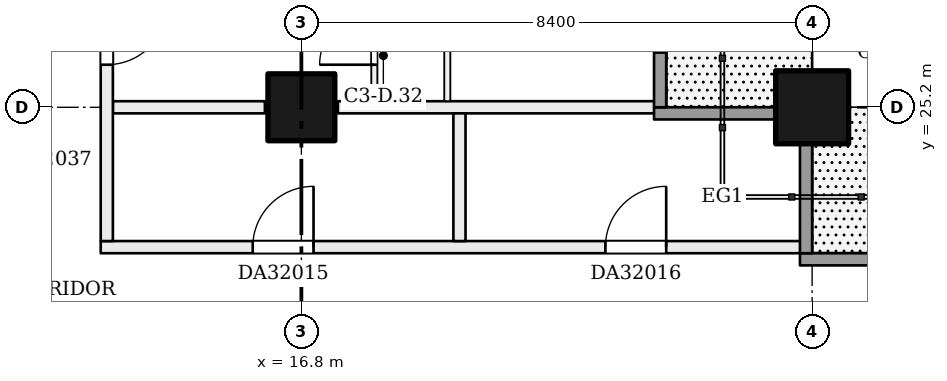
"""IFC4 building model, lengths in metres.
Left out: names, types, materials, properties, quantities, classifications, styles, units other than length and angle.
Written with IfcOpenShell. Run it as: python <this file> out.ifc"""

import sys

from ifc_helpers import new_model, si_unit, direction, frame, frame_2d, origin, origin_2d, place, context, subcontext, project, spatial, rectangle, extrude, element, fill, save


model = new_model("IFC4")
c1 = context("Model", 3, precision=1e-05, world=origin(), true_north=direction((0.0, 1.0)))
c2 = subcontext(c1, "Body", "Model", "MODEL_VIEW")
j1 = project(units=[si_unit("LENGTHUNIT", "METRE"), si_unit("PLANEANGLEUNIT", "RADIAN")], contexts=[c1])
p1 = place(None, origin())
s1 = spatial("IfcSite", under=j1, at=p1, CompositionType="ELEMENT")
p2 = place(p1, origin())
s2 = spatial("IfcBuilding", under=s1, at=p2, CompositionType="ELEMENT")
p3 = place(p2, frame((0.0, 0.0, 126.7)))
s3 = spatial("IfcBuildingStorey", under=s2, at=p3, CompositionType="ELEMENT", Elevation=126.7)
p4 = place(p3, frame((16.8, 25.2, 0.0), z_axis=(0.0, 0.0, 1.0), x_axis=(1.0, 0.0, 0.0)))
e1 = element("IfcColumn", 1, at=p4, inside=s3, PredefinedType="COLUMN", context=c2, shape_type="SweptSolid", body=[
    extrude(rectangle(XDim=1.1, YDim=1.1, at=origin_2d()), origin(), (0.0, 0.0, 1.0), 3.22),
])
p5 = place(p3, frame((25.2, 25.2, 0.0), z_axis=(0.0, 0.0, 1.0), x_axis=(1.0, 0.0, 0.0)))
e2 = element("IfcColumn", 2, at=p5, inside=s3, PredefinedType="COLUMN", context=c2, shape_type="SweptSolid", body=[
    extrude(rectangle(XDim=1.2, YDim=1.2, at=origin_2d()), origin(), (0.0, 0.0, 1.0), 3.22),
])
p6 = place(p3, frame((13.5, 22.9, 0.0), z_axis=(0.0, 0.0, 1.0), x_axis=(1.0, 0.0, 0.0)))
e3 = element("IfcWall", 3, at=p6, inside=s3, PredefinedType="PARTITIONING", context=c2, shape_type="SweptSolid", body=[
    extrude(rectangle(XDim=11.6, YDim=0.2, at=frame_2d((5.8, 0.0))), origin(), (0.0, 0.0, 1.0), 3.22),
])
p7 = place(p6, frame((2.5, 0.0, 0.0)))
e4 = element("IfcOpeningElement", 4, at=p7, cuts=e3, PredefinedType="OPENING", context=c2, shape_type="SweptSolid", body=[
    extrude(rectangle(XDim=1.0, YDim=2.1, at=frame_2d((0.5, 1.05))), frame((0.0, 0.11, 0.0), z_axis=(0.0, -1.0, 0.0), x_axis=(1.0, 0.0, 0.0)), (0.0, 0.0, 1.0), 0.22),
])
p8 = place(p6, frame((8.3, 0.0, 0.0)))
e5 = element("IfcOpeningElement", 5, at=p8, cuts=e3, PredefinedType="OPENING", context=c2, shape_type="SweptSolid", body=[
    extrude(rectangle(XDim=1.0, YDim=2.1, at=frame_2d((0.5, 1.05))), frame((0.0, 0.11, 0.0), z_axis=(0.0, -1.0, 0.0), x_axis=(1.0, 0.0, 0.0)), (0.0, 0.0, 1.0), 0.22),
])
p9 = place(p3, frame((13.7, 25.2, 0.0), z_axis=(0.0, 0.0, 1.0), x_axis=(1.0, 0.0, 0.0)))
e6 = element("IfcWall", 6, at=p9, inside=s3, PredefinedType="PARTITIONING", context=c2, shape_type="SweptSolid", body=[
    extrude(rectangle(XDim=2.5, YDim=0.2, at=frame_2d((1.25, 0.0))), origin(), (0.0, 0.0, 1.0), 3.22),
])
p10 = place(p3, frame((17.4, 25.2, 0.0), z_axis=(0.0, 0.0, 1.0), x_axis=(1.0, 0.0, 0.0)))
e7 = element("IfcWall", 7, at=p10, inside=s3, PredefinedType="PARTITIONING", context=c2, shape_type="SweptSolid", body=[
    extrude(rectangle(XDim=5.3, YDim=0.2, at=frame_2d((2.65, 0.0))), origin(), (0.0, 0.0, 1.0), 3.22),
])
p11 = place(p3, frame((13.6, 23.0, 0.0), z_axis=(0.0, 0.0, 1.0), x_axis=(0.0, 1.0, 0.0)))
e8 = element("IfcWall", 8, at=p11, inside=s3, PredefinedType="PARTITIONING", context=c2, shape_type="SweptSolid", body=[
    extrude(rectangle(XDim=19.0, YDim=0.2, at=frame_2d((9.5, 0.0))), origin(), (0.0, 0.0, 1.0), 3.22),
])
p12 = place(p11, frame((2.9, 0.0, 0.0)))
e9 = element("IfcOpeningElement", 9, at=p12, cuts=e8, PredefinedType="OPENING", context=c2, shape_type="SweptSolid", body=[
    extrude(rectangle(XDim=1.0, YDim=2.1, at=frame_2d((0.5, 1.05))), frame((0.0, 0.11, 0.0), z_axis=(0.0, -1.0, 0.0), x_axis=(1.0, 0.0, 0.0)), (0.0, 0.0, 1.0), 0.22),
])
p13 = place(p3, frame((18.0, 25.3, 0.0), z_axis=(0.0, 0.0, 1.0), x_axis=(0.0, 1.0, 0.0)))
e10 = element("IfcWall", 10, at=p13, inside=s3, PredefinedType="PARTITIONING", context=c2, shape_type="SweptSolid", body=[
    extrude(rectangle(XDim=16.7, YDim=0.1, at=frame_2d((8.35, 0.0))), origin(), (0.0, 0.0, 1.0), 3.22),
])
p14 = place(p13, frame((0.6, 0.0, 0.0)))
e11 = element("IfcOpeningElement", 11, at=p14, cuts=e10, PredefinedType="OPENING", context=c2, shape_type="SweptSolid", body=[
    extrude(rectangle(XDim=0.9, YDim=2.1, at=frame_2d((0.45, 1.05))), frame((0.0, 0.06, 0.0), z_axis=(0.0, -1.0, 0.0), x_axis=(1.0, 0.0, 0.0)), (0.0, 0.0, 1.0), 0.12),
])
p15 = place(p13, frame((3.014, 0.0, 0.0)))
e12 = element("IfcOpeningElement", 12, at=p15, cuts=e10, PredefinedType="OPENING", context=c2, shape_type="SweptSolid", body=[
    extrude(rectangle(XDim=0.9, YDim=2.1, at=frame_2d((0.45, 1.05))), frame((0.0, 0.06, 0.0), z_axis=(0.0, -1.0, 0.0), x_axis=(1.0, 0.0, 0.0)), (0.0, 0.0, 1.0), 0.12),
])
p16 = place(p13, frame((5.229, 0.0, 0.0)))
e13 = element("IfcOpeningElement", 13, at=p16, cuts=e10, PredefinedType="OPENING", context=c2, shape_type="SweptSolid", body=[
    extrude(rectangle(XDim=0.9, YDim=2.1, at=frame_2d((0.45, 1.05))), frame((0.0, 0.06, 0.0), z_axis=(0.0, -1.0, 0.0), x_axis=(1.0, 0.0, 0.0)), (0.0, 0.0, 1.0), 0.12),
])
p17 = place(p13, frame((6.943, 0.0, 0.0)))
e14 = element("IfcOpeningElement", 14, at=p17, cuts=e10, PredefinedType="OPENING", context=c2, shape_type="SweptSolid", body=[
    extrude(rectangle(XDim=0.9, YDim=2.1, at=frame_2d((0.45, 1.05))), frame((0.0, 0.06, 0.0), z_axis=(0.0, -1.0, 0.0), x_axis=(1.0, 0.0, 0.0)), (0.0, 0.0, 1.0), 0.12),
])
p18 = place(p13, frame((10.557, 0.0, 0.0)))
e15 = element("IfcOpeningElement", 15, at=p18, cuts=e10, PredefinedType="OPENING", context=c2, shape_type="SweptSolid", body=[
    extrude(rectangle(XDim=0.9, YDim=2.1, at=frame_2d((0.45, 1.05))), frame((0.0, 0.06, 0.0), z_axis=(0.0, -1.0, 0.0), x_axis=(1.0, 0.0, 0.0)), (0.0, 0.0, 1.0), 0.12),
])
p19 = place(p13, frame((13.072, 0.0, 0.0)))
e16 = element("IfcOpeningElement", 16, at=p19, cuts=e10, PredefinedType="OPENING", context=c2, shape_type="SweptSolid", body=[
    extrude(rectangle(XDim=0.9, YDim=2.1, at=frame_2d((0.45, 1.05))), frame((0.0, 0.06, 0.0), z_axis=(0.0, -1.0, 0.0), x_axis=(1.0, 0.0, 0.0)), (0.0, 0.0, 1.0), 0.12),
])
p20 = place(p13, frame((15.286, 0.0, 0.0)))
e17 = element("IfcOpeningElement", 17, at=p20, cuts=e10, PredefinedType="OPENING", context=c2, shape_type="SweptSolid", body=[
    extrude(rectangle(XDim=0.9, YDim=2.1, at=frame_2d((0.45, 1.05))), frame((0.0, 0.06, 0.0), z_axis=(0.0, -1.0, 0.0), x_axis=(1.0, 0.0, 0.0)), (0.0, 0.0, 1.0), 0.12),
])
p21 = place(p3, frame((19.2, 25.3, 0.0), z_axis=(0.0, 0.0, 1.0), x_axis=(0.0, 1.0, 0.0)))
e18 = element("IfcWall", 18, at=p21, inside=s3, PredefinedType="PARTITIONING", context=c2, shape_type="SweptSolid", body=[
    extrude(rectangle(XDim=16.7, YDim=0.1, at=frame_2d((8.35, 0.0))), origin(), (0.0, 0.0, 1.0), 3.22),
])
p22 = place(p21, frame((1.5, 0.0, 0.0)))
e19 = element("IfcOpeningElement", 19, at=p22, cuts=e18, PredefinedType="OPENING", context=c2, shape_type="SweptSolid", body=[
    extrude(rectangle(XDim=0.9, YDim=2.1, at=frame_2d((0.45, 1.05))), frame((0.0, 0.06, 0.0), z_axis=(0.0, -1.0, 0.0), x_axis=(1.0, 0.0, 0.0)), (0.0, 0.0, 1.0), 0.12),
])
p23 = place(p21, frame((5.7, 0.0, 0.0)))
e20 = element("IfcOpeningElement", 20, at=p23, cuts=e18, PredefinedType="OPENING", context=c2, shape_type="SweptSolid", body=[
    extrude(rectangle(XDim=0.9, YDim=2.1, at=frame_2d((0.45, 1.05))), frame((0.0, 0.06, 0.0), z_axis=(0.0, -1.0, 0.0), x_axis=(1.0, 0.0, 0.0)), (0.0, 0.0, 1.0), 0.12),
])
p24 = place(p21, frame((9.9, 0.0, 0.0)))
e21 = element("IfcOpeningElement", 21, at=p24, cuts=e18, PredefinedType="OPENING", context=c2, shape_type="SweptSolid", body=[
    extrude(rectangle(XDim=0.9, YDim=2.1, at=frame_2d((0.45, 1.05))), frame((0.0, 0.06, 0.0), z_axis=(0.0, -1.0, 0.0), x_axis=(1.0, 0.0, 0.0)), (0.0, 0.0, 1.0), 0.12),
])
p25 = place(p21, frame((14.1, 0.0, 0.0)))
e22 = element("IfcOpeningElement", 22, at=p25, cuts=e18, PredefinedType="OPENING", context=c2, shape_type="SweptSolid", body=[
    extrude(rectangle(XDim=0.9, YDim=2.1, at=frame_2d((0.45, 1.05))), frame((0.0, 0.06, 0.0), z_axis=(0.0, -1.0, 0.0), x_axis=(1.0, 0.0, 0.0)), (0.0, 0.0, 1.0), 0.12),
])
p26 = place(p3, frame((19.4, 23.0, 0.0), z_axis=(0.0, 0.0, 1.0), x_axis=(0.0, 1.0, 0.0)))
e23 = element("IfcWall", 23, at=p26, inside=s3, PredefinedType="PARTITIONING", context=c2, shape_type="SweptSolid", body=[
    extrude(rectangle(XDim=2.1, YDim=0.2, at=frame_2d((1.05, 0.0))), origin(), (0.0, 0.0, 1.0), 3.22),
])
p27 = place(p3, frame((42.0, 22.7, 0.0), z_axis=(0.0, 0.0, 1.0), x_axis=(-1.0, 0.0, 0.0)))
e24 = element("IfcWall", 24, at=p27, inside=s3, PredefinedType="SOLIDWALL", context=c2, shape_type="SweptSolid", body=[
    extrude(rectangle(XDim=17.0, YDim=0.2, at=frame_2d((8.5, 0.0))), origin(), (0.0, 0.0, 1.0), 3.22),
])
p28 = place(p27, frame((9.6, 0.0, 0.0)))
e25 = element("IfcOpeningElement", 25, at=p28, cuts=e24, PredefinedType="OPENING", context=c2, shape_type="SweptSolid", body=[
    extrude(rectangle(XDim=1.8, YDim=2.4, at=frame_2d((0.9, 1.2))), frame((0.0, 0.11, 0.0), z_axis=(0.0, -1.0, 0.0), x_axis=(1.0, 0.0, 0.0)), (0.0, 0.0, 1.0), 0.22),
])
p29 = place(p3, frame((25.1, 22.8, 0.0), z_axis=(0.0, 0.0, 1.0), x_axis=(0.0, 1.0, 0.0)))
e26 = element("IfcWall", 26, at=p29, inside=s3, PredefinedType="SOLIDWALL", context=c2, shape_type="SweptSolid", body=[
    extrude(rectangle(XDim=1.8, YDim=0.2, at=frame_2d((0.9, 0.0))), origin(), (0.0, 0.0, 1.0), 3.22),
])
p30 = place(p3, frame((24.6, 25.1, 0.0), z_axis=(0.0, 0.0, 1.0), x_axis=(-1.0, 0.0, 0.0)))
e27 = element("IfcWall", 27, at=p30, inside=s3, PredefinedType="SOLIDWALL", context=c2, shape_type="SweptSolid", body=[
    extrude(rectangle(XDim=2.0, YDim=0.2, at=frame_2d((1.0, 0.0))), origin(), (0.0, 0.0, 1.0), 3.22),
])
p31 = place(p3, frame((22.7, 25.2, 0.0), z_axis=(0.0, 0.0, 1.0), x_axis=(0.0, 1.0, 0.0)))
e28 = element("IfcWall", 28, at=p31, inside=s3, PredefinedType="SOLIDWALL", context=c2, shape_type="SweptSolid", body=[
    extrude(rectangle(XDim=16.8, YDim=0.2, at=frame_2d((8.4, 0.0))), origin(), (0.0, 0.0, 1.0), 3.22),
])
p32 = place(p31, frame((0.9, 0.0, 0.0)))
e29 = element("IfcOpeningElement", 29, at=p32, cuts=e28, PredefinedType="OPENING", context=c2, shape_type="SweptSolid", body=[
    extrude(rectangle(XDim=2.4, YDim=2.2, at=frame_2d((1.2, 1.1))), frame((0.0, 0.11, 0.0), z_axis=(0.0, -1.0, 0.0), x_axis=(1.0, 0.0, 0.0)), (0.0, 0.0, 1.0), 0.22),
])
p33 = place(p31, frame((5.1, 0.0, 0.9)))
e30 = element("IfcOpeningElement", 30, at=p33, cuts=e28, PredefinedType="OPENING", context=c2, shape_type="SweptSolid", body=[
    extrude(rectangle(XDim=2.4, YDim=1.5, at=frame_2d((1.2, 0.75))), frame((0.0, 0.11, 0.0), z_axis=(0.0, -1.0, 0.0), x_axis=(1.0, 0.0, 0.0)), (0.0, 0.0, 1.0), 0.22),
])
p34 = place(p31, frame((9.3, 0.0, 0.9)))
e31 = element("IfcOpeningElement", 31, at=p34, cuts=e28, PredefinedType="OPENING", context=c2, shape_type="SweptSolid", body=[
    extrude(rectangle(XDim=2.4, YDim=1.5, at=frame_2d((1.2, 0.75))), frame((0.0, 0.11, 0.0), z_axis=(0.0, -1.0, 0.0), x_axis=(1.0, 0.0, 0.0)), (0.0, 0.0, 1.0), 0.22),
])
p35 = place(p31, frame((13.5, 0.0, 0.9)))
e32 = element("IfcOpeningElement", 32, at=p35, cuts=e28, PredefinedType="OPENING", context=c2, shape_type="SweptSolid", body=[
    extrude(rectangle(XDim=2.4, YDim=1.5, at=frame_2d((1.2, 0.75))), frame((0.0, 0.11, 0.0), z_axis=(0.0, -1.0, 0.0), x_axis=(1.0, 0.0, 0.0)), (0.0, 0.0, 1.0), 0.22),
])
p36 = place(p7, origin())
e33 = element("IfcDoor", 33, at=p36, inside=s3, OperationType="SINGLE_SWING_RIGHT", PredefinedType="DOOR", context=c2, shape_type="SweptSolid", body=[
    extrude(rectangle(XDim=1.0, YDim=2.1, at=frame_2d((0.5, 1.05))), frame((0.0, 0.025, 0.0), z_axis=(0.0, -1.0, 0.0), x_axis=(1.0, 0.0, 0.0)), (0.0, 0.0, 1.0), 0.05),
])
fill(e4, e33)
p37 = place(p8, origin())
e34 = element("IfcDoor", 34, at=p37, inside=s3, OperationType="SINGLE_SWING_RIGHT", PredefinedType="DOOR", context=c2, shape_type="SweptSolid", body=[
    extrude(rectangle(XDim=1.0, YDim=2.1, at=frame_2d((0.5, 1.05))), frame((0.0, 0.025, 0.0), z_axis=(0.0, -1.0, 0.0), x_axis=(1.0, 0.0, 0.0)), (0.0, 0.0, 1.0), 0.05),
])
fill(e5, e34)
p38 = place(p12, frame((1.0, 0.0, 0.0), z_axis=(0.0, 0.0, 1.0), x_axis=(-1.0, 0.0, 0.0)))
e35 = element("IfcDoor", 35, at=p38, inside=s3, OperationType="SINGLE_SWING_LEFT", PredefinedType="DOOR", context=c2, shape_type="SweptSolid", body=[
    extrude(rectangle(XDim=1.0, YDim=2.1, at=frame_2d((0.5, 1.05))), frame((0.0, 0.025, 0.0), z_axis=(0.0, -1.0, 0.0), x_axis=(1.0, 0.0, 0.0)), (0.0, 0.0, 1.0), 0.05),
])
fill(e9, e35)
p39 = place(p14, origin())
e36 = element("IfcDoor", 36, at=p39, inside=s3, OperationType="SINGLE_SWING_LEFT", PredefinedType="DOOR", context=c2, shape_type="SweptSolid", body=[
    extrude(rectangle(XDim=0.9, YDim=2.1, at=frame_2d((0.45, 1.05))), frame((0.0, 0.025, 0.0), z_axis=(0.0, -1.0, 0.0), x_axis=(1.0, 0.0, 0.0)), (0.0, 0.0, 1.0), 0.05),
])
fill(e11, e36)
p40 = place(p32, origin())
e37 = element("IfcDoor", 37, at=p40, inside=s3, OperationType="DOUBLE_DOOR_SLIDING", PredefinedType="DOOR", context=c2, shape_type="SweptSolid", body=[
    extrude(rectangle(XDim=2.4, YDim=2.2, at=frame_2d((1.2, 1.1))), frame((0.0, 0.025, 0.0), z_axis=(0.0, -1.0, 0.0), x_axis=(1.0, 0.0, 0.0)), (0.0, 0.0, 1.0), 0.05),
])
fill(e29, e37)
save(model, sys.argv[1])
